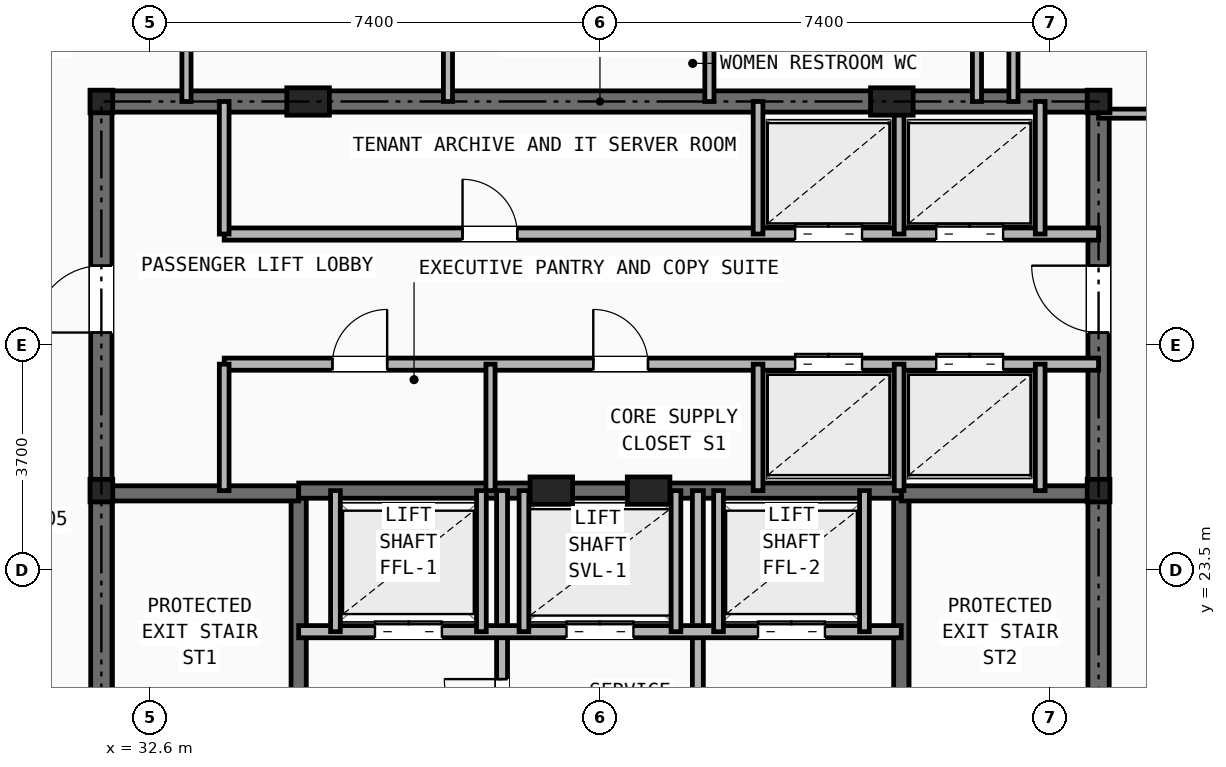
"""IFC4 building model, lengths in metres.
Left out: names, types, materials, properties, quantities, classifications, styles, units other than length and angle.
Written with IfcOpenShell. Run it as: python <this file> out.ifc"""

import sys

from ifc_helpers import new_model, si_unit, direction, frame, frame_2d, origin, origin_2d, place, context, subcontext, project, spatial, rectangle, i_section, extrude, element, fill, save


model = new_model("IFC4")
c1 = context("Model", 3, precision=1e-05, world=origin(), true_north=direction((0.0, 1.0)))
c2 = subcontext(c1, "Body", "Model", "MODEL_VIEW")
j1 = project(units=[si_unit("LENGTHUNIT", "METRE"), si_unit("PLANEANGLEUNIT", "RADIAN")], contexts=[c1])
p1 = place(None, origin())
s1 = spatial("IfcSite", under=j1, at=p1, CompositionType="ELEMENT")
p2 = place(p1, origin())
s2 = spatial("IfcBuilding", under=s1, at=p2, CompositionType="ELEMENT")
p3 = place(p2, frame((0.0, 0.0, 272.5)))
s3 = spatial("IfcBuildingStorey", under=s2, at=p3, CompositionType="ELEMENT", Elevation=272.5)
for number, where, z_axis, x_axis in (
    (1, (31.8, 24.8, 0.0), (0.0, 0.0, 1.0), (1.0, 0.0, 0.0)),
    (2, (48.2, 24.8, 0.0), (0.0, 0.0, 1.0), (1.0, 0.0, 0.0)),
    (3, (31.8, 31.2, 0.0), (0.0, 0.0, 1.0), (1.0, 0.0, 0.0)),
    (4, (48.2, 31.2, 0.0), (0.0, 0.0, 1.0), (1.0, 0.0, 0.0)),
):
    element("IfcColumn", number, at=place(p3, frame(where, z_axis=z_axis, x_axis=x_axis)), inside=s3, PredefinedType="COLUMN", context=c2, shape_type="SweptSolid", body=[
        extrude(i_section(OverallWidth=0.374, OverallDepth=0.372, WebThickness=0.016, FlangeThickness=0.026, at=origin_2d()), origin(), (0.0, 0.0, 1.0), 3.5),
    ])
for number, where, z_axis, x_axis in (
    (5, (35.2, 31.2, 0.0), (0.0, 0.0, 1.0), (1.0, 0.0, 0.0)),
    (6, (44.8, 31.2, 0.0), (0.0, 0.0, 1.0), (1.0, 0.0, 0.0)),
    (7, (39.2, 24.8, 0.0), (0.0, 0.0, 1.0), (1.0, 0.0, 0.0)),
    (8, (40.8, 24.8, 0.0), (0.0, 0.0, 1.0), (1.0, 0.0, 0.0)),
):
    element("IfcColumn", number, at=place(p3, frame(where, z_axis=z_axis, x_axis=x_axis)), inside=s3, PredefinedType="PILASTER", context=c2, shape_type="SweptSolid", body=[
        extrude(rectangle(XDim=0.7, YDim=0.45, at=origin_2d()), origin(), (0.0, 0.0, 1.0), 3.5),
    ])
p4 = place(p3, frame((31.8, 31.2, 0.0), z_axis=(0.0, 0.0, 1.0), x_axis=(1.0, 0.0, 0.0)))
e9 = element("IfcWall", 9, at=p4, inside=s3, PredefinedType="SHEAR", context=c2, shape_type="SweptSolid", body=[
    extrude(rectangle(XDim=16.4, YDim=0.35, at=frame_2d((8.2, 0.0))), origin(), (0.0, 0.0, 1.0), 3.25),
])
p5 = place(p3, frame((31.8, 16.4, 0.0), z_axis=(0.0, 0.0, 1.0), x_axis=(0.0, 1.0, 0.0)))
e10 = element("IfcWall", 10, at=p5, inside=s3, PredefinedType="SHEAR", context=c2, shape_type="SweptSolid", body=[
    extrude(rectangle(XDim=14.8, YDim=0.35, at=frame_2d((7.4, 0.0))), origin(), (0.0, 0.0, 1.0), 3.25),
])
p6 = place(p5, frame((11.0, 0.0, 0.0)))
e11 = element("IfcOpeningElement", 11, at=p6, cuts=e10, PredefinedType="OPENING", context=c2, shape_type="SweptSolid", body=[
    extrude(rectangle(XDim=1.1, YDim=2.15, at=frame_2d((0.55, 1.075))), frame((0.0, 0.185, 0.0), z_axis=(0.0, -1.0, 0.0), x_axis=(1.0, 0.0, 0.0)), (0.0, 0.0, 1.0), 0.37),
])
p7 = place(p3, frame((48.2, 16.4, 0.0), z_axis=(0.0, 0.0, 1.0), x_axis=(0.0, 1.0, 0.0)))
e12 = element("IfcWall", 12, at=p7, inside=s3, PredefinedType="SHEAR", context=c2, shape_type="SweptSolid", body=[
    extrude(rectangle(XDim=14.8, YDim=0.35, at=frame_2d((7.4, 0.0))), origin(), (0.0, 0.0, 1.0), 3.25),
])
p8 = place(p7, frame((11.0, 0.0, 0.0)))
e13 = element("IfcOpeningElement", 13, at=p8, cuts=e12, PredefinedType="OPENING", context=c2, shape_type="SweptSolid", body=[
    extrude(rectangle(XDim=1.1, YDim=2.15, at=frame_2d((0.55, 1.075))), frame((0.0, 0.185, 0.0), z_axis=(0.0, -1.0, 0.0), x_axis=(1.0, 0.0, 0.0)), (0.0, 0.0, 1.0), 0.37),
])
p9 = place(p3, frame((35.045, 16.4, 0.0), z_axis=(0.0, 0.0, 1.0), x_axis=(0.0, 1.0, 0.0)))
e14 = element("IfcWall", 14, at=p9, inside=s3, PredefinedType="SHEAR", context=c2, shape_type="SweptSolid", body=[
    extrude(rectangle(XDim=8.4, YDim=0.25, at=frame_2d((4.2, 0.0))), origin(), (0.0, 0.0, 1.0), 3.25),
])
p10 = place(p9, frame((0.45, 0.0, 0.0)))
e15 = element("IfcOpeningElement", 15, at=p10, cuts=e14, PredefinedType="OPENING", context=c2, shape_type="SweptSolid", body=[
    extrude(rectangle(XDim=0.95, YDim=2.1, at=frame_2d((0.475, 1.05))), frame((0.0, 0.135, 0.0), z_axis=(0.0, -1.0, 0.0), x_axis=(1.0, 0.0, 0.0)), (0.0, 0.0, 1.0), 0.27),
])
p11 = place(p3, frame((31.8, 24.755, 0.0), z_axis=(0.0, 0.0, 1.0), x_axis=(1.0, 0.0, 0.0)))
e16 = element("IfcWall", 16, at=p11, inside=s3, PredefinedType="SHEAR", context=c2, shape_type="SweptSolid", body=[
    extrude(rectangle(XDim=3.245, YDim=0.25, at=frame_2d((1.623, 0.0))), origin(), (0.0, 0.0, 1.0), 3.25),
])
p12 = place(p3, frame((44.955, 16.4, 0.0), z_axis=(0.0, 0.0, 1.0), x_axis=(0.0, 1.0, 0.0)))
e17 = element("IfcWall", 17, at=p12, inside=s3, PredefinedType="SHEAR", context=c2, shape_type="SweptSolid", body=[
    extrude(rectangle(XDim=8.4, YDim=0.25, at=frame_2d((4.2, 0.0))), origin(), (0.0, 0.0, 1.0), 3.25),
])
p13 = place(p12, frame((0.45, 0.0, 0.0)))
e18 = element("IfcOpeningElement", 18, at=p13, cuts=e17, PredefinedType="OPENING", context=c2, shape_type="SweptSolid", body=[
    extrude(rectangle(XDim=0.95, YDim=2.1, at=frame_2d((0.475, 1.05))), frame((0.0, 0.135, 0.0), z_axis=(0.0, -1.0, 0.0), x_axis=(1.0, 0.0, 0.0)), (0.0, 0.0, 1.0), 0.27),
])
p14 = place(p3, frame((44.955, 24.755, 0.0), z_axis=(0.0, 0.0, 1.0), x_axis=(1.0, 0.0, 0.0)))
e19 = element("IfcWall", 19, at=p14, inside=s3, PredefinedType="SHEAR", context=c2, shape_type="SweptSolid", body=[
    extrude(rectangle(XDim=3.245, YDim=0.25, at=frame_2d((1.623, 0.0))), origin(), (0.0, 0.0, 1.0), 3.25),
])
p15 = place(p3, frame((35.045, 24.8, 0.0), z_axis=(0.0, 0.0, 1.0), x_axis=(1.0, 0.0, 0.0)))
e20 = element("IfcWall", 20, at=p15, inside=s3, PredefinedType="SHEAR", context=c2, shape_type="SweptSolid", body=[
    extrude(rectangle(XDim=9.91, YDim=0.25, at=frame_2d((4.955, 0.0))), origin(), (0.0, 0.0, 1.0), 3.25),
])
p16 = place(p3, frame((38.39, 16.4, 0.0), z_axis=(0.0, 0.0, 1.0), x_axis=(0.0, 1.0, 0.0)))
e21 = element("IfcWall", 21, at=p16, inside=s3, PredefinedType="PARTITIONING", context=c2, shape_type="SweptSolid", body=[
    extrude(rectangle(XDim=8.4, YDim=0.18, at=frame_2d((4.2, 0.0))), origin(), (0.0, 0.0, 1.0), 2.705),
])
p17 = place(p16, frame((1.8, 0.0, 0.0)))
e22 = element("IfcOpeningElement", 22, at=p17, cuts=e21, PredefinedType="OPENING", context=c2, shape_type="SweptSolid", body=[
    extrude(rectangle(XDim=0.85, YDim=2.05, at=frame_2d((0.425, 1.025))), frame((0.0, 0.1, 0.0), z_axis=(0.0, -1.0, 0.0), x_axis=(1.0, 0.0, 0.0)), (0.0, 0.0, 1.0), 0.2),
])
p18 = place(p16, frame((4.35, 0.0, 0.0)))
e23 = element("IfcOpeningElement", 23, at=p18, cuts=e21, PredefinedType="OPENING", context=c2, shape_type="SweptSolid", body=[
    extrude(rectangle(XDim=0.95, YDim=2.1, at=frame_2d((0.475, 1.05))), frame((0.0, 0.1, 0.0), z_axis=(0.0, -1.0, 0.0), x_axis=(1.0, 0.0, 0.0)), (0.0, 0.0, 1.0), 0.2),
])
p19 = place(p3, frame((41.61, 16.4, 0.0), z_axis=(0.0, 0.0, 1.0), x_axis=(0.0, 1.0, 0.0)))
e24 = element("IfcWall", 24, at=p19, inside=s3, PredefinedType="PARTITIONING", context=c2, shape_type="SweptSolid", body=[
    extrude(rectangle(XDim=8.4, YDim=0.18, at=frame_2d((4.2, 0.0))), origin(), (0.0, 0.0, 1.0), 2.705),
])
p20 = place(p19, frame((1.8, 0.0, 0.0)))
e25 = element("IfcOpeningElement", 25, at=p20, cuts=e24, PredefinedType="OPENING", context=c2, shape_type="SweptSolid", body=[
    extrude(rectangle(XDim=0.85, YDim=2.05, at=frame_2d((0.425, 1.025))), frame((0.0, 0.1, 0.0), z_axis=(0.0, -1.0, 0.0), x_axis=(1.0, 0.0, 0.0)), (0.0, 0.0, 1.0), 0.2),
])
p21 = place(p3, frame((35.045, 22.48, 0.0), z_axis=(0.0, 0.0, 1.0), x_axis=(1.0, 0.0, 0.0)))
e26 = element("IfcWall", 26, at=p21, inside=s3, PredefinedType="SOLIDWALL", context=c2, shape_type="SweptSolid", body=[
    extrude(rectangle(XDim=9.91, YDim=0.2, at=frame_2d((4.955, 0.0))), origin(), (0.0, 0.0, 1.0), 3.25),
])
p22 = place(p21, frame((1.255, 0.0, 0.0)))
e27 = element("IfcOpeningElement", 27, at=p22, cuts=e26, PredefinedType="OPENING", context=c2, shape_type="SweptSolid", body=[
    extrude(rectangle(XDim=1.1, YDim=2.15, at=frame_2d((0.55, 1.075))), frame((0.0, 0.11, 0.0), z_axis=(0.0, -1.0, 0.0), x_axis=(1.0, 0.0, 0.0)), (0.0, 0.0, 1.0), 0.22),
])
p23 = place(p21, frame((7.555, 0.0, 0.0)))
e28 = element("IfcOpeningElement", 28, at=p23, cuts=e26, PredefinedType="OPENING", context=c2, shape_type="SweptSolid", body=[
    extrude(rectangle(XDim=1.1, YDim=2.15, at=frame_2d((0.55, 1.075))), frame((0.0, 0.11, 0.0), z_axis=(0.0, -1.0, 0.0), x_axis=(1.0, 0.0, 0.0)), (0.0, 0.0, 1.0), 0.22),
])
p24 = place(p21, frame((4.405, 0.0, 0.0)))
e29 = element("IfcOpeningElement", 29, at=p24, cuts=e26, PredefinedType="OPENING", context=c2, shape_type="SweptSolid", body=[
    extrude(rectangle(XDim=1.1, YDim=2.15, at=frame_2d((0.55, 1.075))), frame((0.0, 0.11, 0.0), z_axis=(0.0, -1.0, 0.0), x_axis=(1.0, 0.0, 0.0)), (0.0, 0.0, 1.0), 0.22),
])
for number, where, z_axis, x_axis in (
    (30, (35.65, 22.48, 0.0), (0.0, 0.0, 1.0), (0.0, 1.0, 0.0)),
    (31, (38.05, 22.48, 0.0), (0.0, 0.0, 1.0), (0.0, 1.0, 0.0)),
    (32, (41.95, 22.48, 0.0), (0.0, 0.0, 1.0), (0.0, 1.0, 0.0)),
    (33, (44.35, 22.48, 0.0), (0.0, 0.0, 1.0), (0.0, 1.0, 0.0)),
    (34, (38.75, 22.48, 0.0), (0.0, 0.0, 1.0), (0.0, 1.0, 0.0)),
    (35, (41.25, 22.48, 0.0), (0.0, 0.0, 1.0), (0.0, 1.0, 0.0)),
):
    element("IfcWall", number, at=place(p3, frame(where, z_axis=z_axis, x_axis=x_axis)), inside=s3, PredefinedType="SOLIDWALL", context=c2, shape_type="SweptSolid", body=[
        extrude(rectangle(XDim=2.32, YDim=0.16, at=frame_2d((1.16, 0.0))), origin(), (0.0, 0.0, 1.0), 3.25),
    ])
p25 = place(p3, frame((33.82, 29.02, 0.0), z_axis=(0.0, 0.0, 1.0), x_axis=(1.0, 0.0, 0.0)))
e36 = element("IfcWall", 36, at=p25, inside=s3, PredefinedType="SOLIDWALL", context=c2, shape_type="SweptSolid", body=[
    extrude(rectangle(XDim=14.38, YDim=0.2, at=frame_2d((7.19, 0.0))), origin(), (0.0, 0.0, 1.0), 2.705),
])
p26 = place(p25, frame((3.92, 0.0, 0.0)))
e37 = element("IfcOpeningElement", 37, at=p26, cuts=e36, PredefinedType="OPENING", context=c2, shape_type="SweptSolid", body=[
    extrude(rectangle(XDim=0.9, YDim=2.1, at=frame_2d((0.45, 1.05))), frame((0.0, 0.11, 0.0), z_axis=(0.0, -1.0, 0.0), x_axis=(1.0, 0.0, 0.0)), (0.0, 0.0, 1.0), 0.22),
])
p27 = place(p25, frame((9.39, 0.0, 0.0)))
e38 = element("IfcOpeningElement", 38, at=p27, cuts=e36, PredefinedType="OPENING", context=c2, shape_type="SweptSolid", body=[
    extrude(rectangle(XDim=1.1, YDim=2.15, at=frame_2d((0.55, 1.075))), frame((0.0, 0.11, 0.0), z_axis=(0.0, -1.0, 0.0), x_axis=(1.0, 0.0, 0.0)), (0.0, 0.0, 1.0), 0.22),
])
p28 = place(p25, frame((11.71, 0.0, 0.0)))
e39 = element("IfcOpeningElement", 39, at=p28, cuts=e36, PredefinedType="OPENING", context=c2, shape_type="SweptSolid", body=[
    extrude(rectangle(XDim=1.1, YDim=2.15, at=frame_2d((0.55, 1.075))), frame((0.0, 0.11, 0.0), z_axis=(0.0, -1.0, 0.0), x_axis=(1.0, 0.0, 0.0)), (0.0, 0.0, 1.0), 0.22),
])
p29 = place(p3, frame((33.82, 26.88, 0.0), z_axis=(0.0, 0.0, 1.0), x_axis=(1.0, 0.0, 0.0)))
e40 = element("IfcWall", 40, at=p29, inside=s3, PredefinedType="SOLIDWALL", context=c2, shape_type="SweptSolid", body=[
    extrude(rectangle(XDim=14.38, YDim=0.2, at=frame_2d((7.19, 0.0))), origin(), (0.0, 0.0, 1.0), 2.705),
])
p30 = place(p29, frame((1.78, 0.0, 0.0)))
e41 = element("IfcOpeningElement", 41, at=p30, cuts=e40, PredefinedType="OPENING", context=c2, shape_type="SweptSolid", body=[
    extrude(rectangle(XDim=0.9, YDim=2.1, at=frame_2d((0.45, 1.05))), frame((0.0, 0.11, 0.0), z_axis=(0.0, -1.0, 0.0), x_axis=(1.0, 0.0, 0.0)), (0.0, 0.0, 1.0), 0.22),
])
p31 = place(p29, frame((6.07, 0.0, 0.0)))
e42 = element("IfcOpeningElement", 42, at=p31, cuts=e40, PredefinedType="OPENING", context=c2, shape_type="SweptSolid", body=[
    extrude(rectangle(XDim=0.9, YDim=2.1, at=frame_2d((0.45, 1.05))), frame((0.0, 0.11, 0.0), z_axis=(0.0, -1.0, 0.0), x_axis=(1.0, 0.0, 0.0)), (0.0, 0.0, 1.0), 0.22),
])
p32 = place(p29, frame((9.39, 0.0, 0.0)))
e43 = element("IfcOpeningElement", 43, at=p32, cuts=e40, PredefinedType="OPENING", context=c2, shape_type="SweptSolid", body=[
    extrude(rectangle(XDim=1.1, YDim=2.15, at=frame_2d((0.55, 1.075))), frame((0.0, 0.11, 0.0), z_axis=(0.0, -1.0, 0.0), x_axis=(1.0, 0.0, 0.0)), (0.0, 0.0, 1.0), 0.22),
])
p33 = place(p29, frame((11.71, 0.0, 0.0)))
e44 = element("IfcOpeningElement", 44, at=p33, cuts=e40, PredefinedType="OPENING", context=c2, shape_type="SweptSolid", body=[
    extrude(rectangle(XDim=1.1, YDim=2.15, at=frame_2d((0.55, 1.075))), frame((0.0, 0.11, 0.0), z_axis=(0.0, -1.0, 0.0), x_axis=(1.0, 0.0, 0.0)), (0.0, 0.0, 1.0), 0.22),
])
p34 = place(p3, frame((33.82, 29.02, 0.0), z_axis=(0.0, 0.0, 1.0), x_axis=(0.0, 1.0, 0.0)))
e45 = element("IfcWall", 45, at=p34, inside=s3, PredefinedType="SOLIDWALL", context=c2, shape_type="SweptSolid", body=[
    extrude(rectangle(XDim=2.18, YDim=0.16, at=frame_2d((1.09, 0.0))), origin(), (0.0, 0.0, 1.0), 2.705),
])
p35 = place(p3, frame((33.82, 24.8, 0.0), z_axis=(0.0, 0.0, 1.0), x_axis=(0.0, 1.0, 0.0)))
e46 = element("IfcWall", 46, at=p35, inside=s3, PredefinedType="SOLIDWALL", context=c2, shape_type="SweptSolid", body=[
    extrude(rectangle(XDim=2.08, YDim=0.16, at=frame_2d((1.04, 0.0))), origin(), (0.0, 0.0, 1.0), 3.25),
])
p36 = place(p3, frame((38.2, 24.8, 0.0), z_axis=(0.0, 0.0, 1.0), x_axis=(0.0, 1.0, 0.0)))
e47 = element("IfcWall", 47, at=p36, inside=s3, PredefinedType="PARTITIONING", context=c2, shape_type="SweptSolid", body=[
    extrude(rectangle(XDim=2.08, YDim=0.15, at=frame_2d((1.04, 0.0))), origin(), (0.0, 0.0, 1.0), 3.25),
])
for number, where, z_axis, x_axis in (
    (48, (42.6, 29.02, 0.0), (0.0, 0.0, 1.0), (0.0, 1.0, 0.0)),
    (49, (44.92, 29.02, 0.0), (0.0, 0.0, 1.0), (0.0, 1.0, 0.0)),
    (50, (47.24, 29.02, 0.0), (0.0, 0.0, 1.0), (0.0, 1.0, 0.0)),
):
    element("IfcWall", number, at=place(p3, frame(where, z_axis=z_axis, x_axis=x_axis)), inside=s3, PredefinedType="SOLIDWALL", context=c2, shape_type="SweptSolid", body=[
        extrude(rectangle(XDim=2.18, YDim=0.16, at=frame_2d((1.09, 0.0))), origin(), (0.0, 0.0, 1.0), 2.705),
    ])
for number, where, z_axis, x_axis in (
    (51, (42.6, 24.8, 0.0), (0.0, 0.0, 1.0), (0.0, 1.0, 0.0)),
    (52, (44.92, 24.8, 0.0), (0.0, 0.0, 1.0), (0.0, 1.0, 0.0)),
    (53, (47.24, 24.8, 0.0), (0.0, 0.0, 1.0), (0.0, 1.0, 0.0)),
):
    element("IfcWall", number, at=place(p3, frame(where, z_axis=z_axis, x_axis=x_axis)), inside=s3, PredefinedType="SOLIDWALL", context=c2, shape_type="SweptSolid", body=[
        extrude(rectangle(XDim=2.08, YDim=0.16, at=frame_2d((1.04, 0.0))), origin(), (0.0, 0.0, 1.0), 3.25),
    ])
for number, where, z_axis, x_axis in (
    (54, (33.2, 31.2, 0.0), (0.0, 0.0, 1.0), (0.0, 1.0, 0.0)),
    (55, (46.2, 31.2, 0.0), (0.0, 0.0, 1.0), (0.0, 1.0, 0.0)),
    (56, (37.5, 31.2, 0.0), (0.0, 0.0, 1.0), (0.0, 1.0, 0.0)),
    (57, (41.8, 31.2, 0.0), (0.0, 0.0, 1.0), (0.0, 1.0, 0.0)),
):
    element("IfcWall", number, at=place(p3, frame(where, z_axis=z_axis, x_axis=x_axis)), inside=s3, PredefinedType="PARTITIONING", context=c2, shape_type="SweptSolid", body=[
        extrude(rectangle(XDim=2.6, YDim=0.15, at=frame_2d((1.3, 0.0))), origin(), (0.0, 0.0, 1.0), 2.705),
    ])
p37 = place(p3, frame((46.8, 31.2, 0.0), z_axis=(0.0, 0.0, 1.0), x_axis=(0.0, 1.0, 0.0)))
e58 = element("IfcWall", 58, at=p37, inside=s3, PredefinedType="PARTITIONING", context=c2, shape_type="SweptSolid", body=[
    extrude(rectangle(XDim=4.5, YDim=0.15, at=frame_2d((2.25, 0.0))), origin(), (0.0, 0.0, 1.0), 2.705),
])
p38 = place(p3, frame((48.2, 31.0, 0.0), z_axis=(0.0, 0.0, 1.0), x_axis=(1.0, 0.0, 0.0)))
e59 = element("IfcWall", 59, at=p38, inside=s3, PredefinedType="PARTITIONING", context=c2, shape_type="SweptSolid", body=[
    extrude(rectangle(XDim=4.468, YDim=0.15, at=frame_2d((2.234, 0.0))), origin(), (0.0, 0.0, 1.0), 2.265),
])
p39 = place(p38, frame((1.4, 0.0, 0.0)))
e60 = element("IfcOpeningElement", 60, at=p39, cuts=e59, PredefinedType="OPENING", context=c2, shape_type="SweptSolid", body=[
    extrude(rectangle(XDim=0.95, YDim=2.1, at=frame_2d((0.475, 1.05))), frame((0.0, 0.085, 0.0), z_axis=(0.0, -1.0, 0.0), x_axis=(1.0, 0.0, 0.0)), (0.0, 0.0, 1.0), 0.17),
])
p40 = place(p18, origin())
e61 = element("IfcDoor", 61, at=p40, inside=s3, OperationType="SINGLE_SWING_RIGHT", PredefinedType="DOOR", context=c2, shape_type="SweptSolid", body=[
    extrude(rectangle(XDim=0.95, YDim=2.1, at=frame_2d((0.475, 1.05))), frame((0.0, 0.025, 0.0), z_axis=(0.0, -1.0, 0.0), x_axis=(1.0, 0.0, 0.0)), (0.0, 0.0, 1.0), 0.05),
])
fill(e23, e61)
p41 = place(p22, origin())
e62 = element("IfcDoor", 62, at=p41, inside=s3, OperationType="DOUBLE_DOOR_SLIDING", PredefinedType="DOOR", context=c2, shape_type="SweptSolid", body=[
    extrude(rectangle(XDim=1.1, YDim=2.15, at=frame_2d((0.55, 1.075))), frame((0.0, 0.025, 0.0), z_axis=(0.0, -1.0, 0.0), x_axis=(1.0, 0.0, 0.0)), (0.0, 0.0, 1.0), 0.05),
])
fill(e27, e62)
p42 = place(p23, origin())
e63 = element("IfcDoor", 63, at=p42, inside=s3, OperationType="DOUBLE_DOOR_SLIDING", PredefinedType="DOOR", context=c2, shape_type="SweptSolid", body=[
    extrude(rectangle(XDim=1.1, YDim=2.15, at=frame_2d((0.55, 1.075))), frame((0.0, 0.025, 0.0), z_axis=(0.0, -1.0, 0.0), x_axis=(1.0, 0.0, 0.0)), (0.0, 0.0, 1.0), 0.05),
])
fill(e28, e63)
p43 = place(p24, origin())
e64 = element("IfcDoor", 64, at=p43, inside=s3, OperationType="DOUBLE_DOOR_SLIDING", PredefinedType="DOOR", context=c2, shape_type="SweptSolid", body=[
    extrude(rectangle(XDim=1.1, YDim=2.15, at=frame_2d((0.55, 1.075))), frame((0.0, 0.025, 0.0), z_axis=(0.0, -1.0, 0.0), x_axis=(1.0, 0.0, 0.0)), (0.0, 0.0, 1.0), 0.05),
])
fill(e29, e64)
p44 = place(p6, origin())
e65 = element("IfcDoor", 65, at=p44, inside=s3, OperationType="SINGLE_SWING_LEFT", PredefinedType="DOOR", context=c2, shape_type="SweptSolid", body=[
    extrude(rectangle(XDim=1.1, YDim=2.15, at=frame_2d((0.55, 1.075))), frame((0.0, 0.025, 0.0), z_axis=(0.0, -1.0, 0.0), x_axis=(1.0, 0.0, 0.0)), (0.0, 0.0, 1.0), 0.05),
])
fill(e11, e65)
p45 = place(p8, origin())
e66 = element("IfcDoor", 66, at=p45, inside=s3, OperationType="SINGLE_SWING_RIGHT", PredefinedType="DOOR", context=c2, shape_type="SweptSolid", body=[
    extrude(rectangle(XDim=1.1, YDim=2.15, at=frame_2d((0.55, 1.075))), frame((0.0, 0.025, 0.0), z_axis=(0.0, -1.0, 0.0), x_axis=(1.0, 0.0, 0.0)), (0.0, 0.0, 1.0), 0.05),
])
fill(e13, e66)
p46 = place(p26, origin())
e67 = element("IfcDoor", 67, at=p46, inside=s3, OperationType="SINGLE_SWING_LEFT", PredefinedType="DOOR", context=c2, shape_type="SweptSolid", body=[
    extrude(rectangle(XDim=0.9, YDim=2.1, at=frame_2d((0.45, 1.05))), frame((0.0, 0.025, 0.0), z_axis=(0.0, -1.0, 0.0), x_axis=(1.0, 0.0, 0.0)), (0.0, 0.0, 1.0), 0.05),
])
fill(e37, e67)
p47 = place(p30, origin())
e68 = element("IfcDoor", 68, at=p47, inside=s3, OperationType="SINGLE_SWING_RIGHT", PredefinedType="DOOR", context=c2, shape_type="SweptSolid", body=[
    extrude(rectangle(XDim=0.9, YDim=2.1, at=frame_2d((0.45, 1.05))), frame((0.0, 0.025, 0.0), z_axis=(0.0, -1.0, 0.0), x_axis=(1.0, 0.0, 0.0)), (0.0, 0.0, 1.0), 0.05),
])
fill(e41, e68)
p48 = place(p31, origin())
e69 = element("IfcDoor", 69, at=p48, inside=s3, OperationType="SINGLE_SWING_LEFT", PredefinedType="DOOR", context=c2, shape_type="SweptSolid", body=[
    extrude(rectangle(XDim=0.9, YDim=2.1, at=frame_2d((0.45, 1.05))), frame((0.0, 0.025, 0.0), z_axis=(0.0, -1.0, 0.0), x_axis=(1.0, 0.0, 0.0)), (0.0, 0.0, 1.0), 0.05),
])
fill(e42, e69)
p49 = place(p27, origin())
e70 = element("IfcDoor", 70, at=p49, inside=s3, OperationType="DOUBLE_DOOR_SLIDING", PredefinedType="DOOR", context=c2, shape_type="SweptSolid", body=[
    extrude(rectangle(XDim=1.1, YDim=2.15, at=frame_2d((0.55, 1.075))), frame((0.0, 0.025, 0.0), z_axis=(0.0, -1.0, 0.0), x_axis=(1.0, 0.0, 0.0)), (0.0, 0.0, 1.0), 0.05),
])
fill(e38, e70)
p50 = place(p28, origin())
e71 = element("IfcDoor", 71, at=p50, inside=s3, OperationType="DOUBLE_DOOR_SLIDING", PredefinedType="DOOR", context=c2, shape_type="SweptSolid", body=[
    extrude(rectangle(XDim=1.1, YDim=2.15, at=frame_2d((0.55, 1.075))), frame((0.0, 0.025, 0.0), z_axis=(0.0, -1.0, 0.0), x_axis=(1.0, 0.0, 0.0)), (0.0, 0.0, 1.0), 0.05),
])
fill(e39, e71)
p51 = place(p32, origin())
e72 = element("IfcDoor", 72, at=p51, inside=s3, OperationType="DOUBLE_DOOR_SLIDING", PredefinedType="DOOR", context=c2, shape_type="SweptSolid", body=[
    extrude(rectangle(XDim=1.1, YDim=2.15, at=frame_2d((0.55, 1.075))), frame((0.0, 0.025, 0.0), z_axis=(0.0, -1.0, 0.0), x_axis=(1.0, 0.0, 0.0)), (0.0, 0.0, 1.0), 0.05),
])
fill(e43, e72)
p52 = place(p33, origin())
e73 = element("IfcDoor", 73, at=p52, inside=s3, OperationType="DOUBLE_DOOR_SLIDING", PredefinedType="DOOR", context=c2, shape_type="SweptSolid", body=[
    extrude(rectangle(XDim=1.1, YDim=2.15, at=frame_2d((0.55, 1.075))), frame((0.0, 0.025, 0.0), z_axis=(0.0, -1.0, 0.0), x_axis=(1.0, 0.0, 0.0)), (0.0, 0.0, 1.0), 0.05),
])
fill(e44, e73)
save(model, sys.argv[1])
